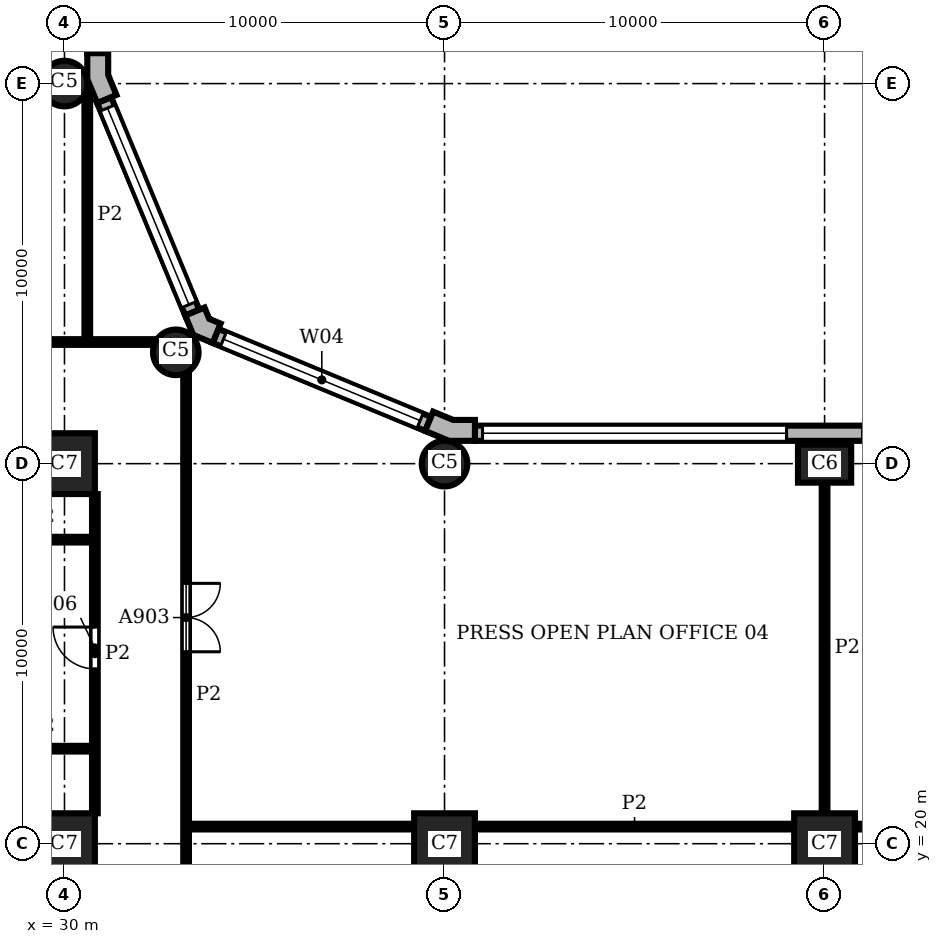
"""IFC4 building model, lengths in metres.
Left out: names, types, materials, properties, quantities, classifications, styles, units other than length and angle.
Written with IfcOpenShell. Run it as: python <this file> out.ifc"""

import sys

from ifc_helpers import new_model, si_unit, direction, frame, frame_2d, origin, origin_2d, place, context, subcontext, project, spatial, polyline, rectangle, circle, outline, extrude, element, fill, save


model = new_model("IFC4")
c1 = context("Model", 3, precision=1e-05, world=origin(), true_north=direction((0.0, 1.0)))
c2 = subcontext(c1, "Body", "Model", "MODEL_VIEW")
j1 = project(units=[si_unit("LENGTHUNIT", "METRE"), si_unit("PLANEANGLEUNIT", "RADIAN")], contexts=[c1])
p1 = place(None, origin())
s1 = spatial("IfcSite", under=j1, at=p1, CompositionType="ELEMENT")
p2 = place(p1, origin())
s2 = spatial("IfcBuilding", under=s1, at=p2, CompositionType="ELEMENT")
p3 = place(p2, frame((0.0, 0.0, 105.6)))
s3 = spatial("IfcBuildingStorey", under=s2, at=p3, CompositionType="ELEMENT", Elevation=105.6)
p4 = place(p3, frame((50.0, 30.0, 0.0), z_axis=(0.0, 0.0, 1.0), x_axis=(1.0, 0.0, 0.0)))
e1 = element("IfcColumn", 1, at=p4, inside=s3, PredefinedType="COLUMN", context=c2, shape_type="SweptSolid", body=[
    extrude(rectangle(XDim=1.4, YDim=1.0, at=origin_2d()), origin(), (0.0, 0.0, 1.0), 3.9),
])
for number, where, z_axis, x_axis in (
    (2, (40.0, 30.0, 0.0), (0.0, 0.0, 1.0), (1.0, 0.0, 0.0)),
    (3, (32.929, 32.929, 0.0), (0.0, 0.0, 1.0), (1.0, 0.0, 0.0)),
    (4, (30.0, 40.0, 0.0), (0.0, 0.0, 1.0), (1.0, 0.0, 0.0)),
):
    element("IfcColumn", number, at=place(p3, frame(where, z_axis=z_axis, x_axis=x_axis)), inside=s3, PredefinedType="COLUMN", context=c2, shape_type="SweptSolid", body=[
        extrude(circle(Radius=0.6, at=origin_2d()), origin(), (0.0, 0.0, 1.0), 3.9),
    ])
for number, where, z_axis, x_axis in (
    (5, (30.0, 20.0, 0.0), (0.0, 0.0, 1.0), (1.0, 0.0, 0.0)),
    (6, (30.0, 30.0, 0.0), (0.0, 0.0, 1.0), (1.0, 0.0, 0.0)),
    (7, (40.0, 20.0, 0.0), (0.0, 0.0, 1.0), (1.0, 0.0, 0.0)),
    (8, (50.0, 20.0, 0.0), (0.0, 0.0, 1.0), (1.0, 0.0, 0.0)),
):
    element("IfcColumn", number, at=place(p3, frame(where, z_axis=z_axis, x_axis=x_axis)), inside=s3, PredefinedType="COLUMN", context=c2, shape_type="SweptSolid", body=[
        extrude(rectangle(XDim=1.6, YDim=1.6, at=origin_2d()), origin(), (0.0, 0.0, 1.0), 3.9),
    ])
p5 = place(p3, origin())
e9 = element("IfcWall", 9, at=p5, inside=s3, PredefinedType="SOLIDWALL", context=c2, shape_type="SweptSolid", body=[
    extrude(outline(polyline([(40.8, 31.0), (40.8, 31.15), (40.229, 31.15), (39.701, 31.369), (39.644, 31.23), (39.49, 30.861), (40.119, 30.6), (40.8, 30.6), (40.8, 31.0)])), origin(), (0.0, 0.0, 1.0), 3.9),
])
e10 = element("IfcWall", 10, at=p5, inside=s3, PredefinedType="SOLIDWALL", context=c2, shape_type="SweptSolid", body=[
    extrude(outline(polyline([(34.051, 33.547), (34.108, 33.685), (33.809, 33.809), (33.685, 34.108), (33.547, 34.051), (33.177, 33.898), (33.388, 33.388), (33.898, 33.177), (34.051, 33.547)])), origin(), (0.0, 0.0, 1.0), 3.9),
])
e11 = element("IfcWall", 11, at=p5, inside=s3, PredefinedType="SOLIDWALL", context=c2, shape_type="SweptSolid", body=[
    extrude(outline(polyline([(31.23, 39.644), (31.369, 39.701), (31.15, 40.229), (31.15, 40.8), (31.0, 40.8), (30.6, 40.8), (30.6, 40.119), (30.861, 39.49), (31.23, 39.644)])), origin(), (0.0, 0.0, 1.0), 3.9),
])
p6 = place(p3, frame((69.2, 30.8, 0.0), z_axis=(0.0, 0.0, 1.0), x_axis=(-1.0, 0.0, 0.0)))
e12 = element("IfcWall", 12, at=p6, inside=s3, PredefinedType="SOLIDWALL", context=c2, shape_type="SweptSolid", body=[
    extrude(rectangle(XDim=28.4, YDim=0.4, at=frame_2d((14.2, 0.0))), origin(), (0.0, 0.0, 1.0), 3.9),
])
p7 = place(p6, frame((0.2, 0.0, 0.9)))
e13 = element("IfcOpeningElement", 13, at=p7, cuts=e12, PredefinedType="OPENING", context=c2, shape_type="SweptSolid", body=[
    extrude(rectangle(XDim=8.0, YDim=2.35, at=frame_2d((4.0, 1.175))), frame((0.0, 0.21, 0.0), z_axis=(0.0, -1.0, 0.0), x_axis=(1.0, 0.0, 0.0)), (0.0, 0.0, 1.0), 0.42),
])
p8 = place(p6, frame((10.2, 0.0, 0.9)))
e14 = element("IfcOpeningElement", 14, at=p8, cuts=e12, PredefinedType="OPENING", context=c2, shape_type="SweptSolid", body=[
    extrude(rectangle(XDim=8.0, YDim=2.35, at=frame_2d((4.0, 1.175))), frame((0.0, 0.21, 0.0), z_axis=(0.0, -1.0, 0.0), x_axis=(1.0, 0.0, 0.0)), (0.0, 0.0, 1.0), 0.42),
])
p9 = place(p6, frame((20.2, 0.0, 0.9)))
e15 = element("IfcOpeningElement", 15, at=p9, cuts=e12, PredefinedType="OPENING", context=c2, shape_type="SweptSolid", body=[
    extrude(rectangle(XDim=8.0, YDim=2.35, at=frame_2d((4.0, 1.175))), frame((0.0, 0.21, 0.0), z_axis=(0.0, -1.0, 0.0), x_axis=(1.0, 0.0, 0.0)), (0.0, 0.0, 1.0), 0.42),
])
p10 = place(p3, frame((39.567, 31.045, 0.0), z_axis=(0.0, 0.0, 1.0), x_axis=(-0.923891000409, 0.382655745237, 0.0)))
e16 = element("IfcWall", 16, at=p10, inside=s3, PredefinedType="SOLIDWALL", context=c2, shape_type="SweptSolid", body=[
    extrude(rectangle(XDim=6.053, YDim=0.4, at=frame_2d((3.027, 0.0))), origin(), (0.0, 0.0, 1.0), 3.9),
])
p11 = place(p10, frame((0.227, 0.0, 0.9)))
e17 = element("IfcOpeningElement", 17, at=p11, cuts=e16, PredefinedType="OPENING", context=c2, shape_type="SweptSolid", body=[
    extrude(rectangle(XDim=5.6, YDim=2.35, at=frame_2d((2.8, 1.175))), frame((0.0, 0.21, 0.0), z_axis=(0.0, -1.0, 0.0), x_axis=(1.0, 0.0, 0.0)), (0.0, 0.0, 1.0), 0.42),
])
p12 = place(p3, frame((33.362, 33.974, 0.0), z_axis=(0.0, 0.0, 1.0), x_axis=(-0.382655745237, 0.923891000409, 0.0)))
e18 = element("IfcWall", 18, at=p12, inside=s3, PredefinedType="SOLIDWALL", context=c2, shape_type="SweptSolid", body=[
    extrude(rectangle(XDim=6.053, YDim=0.4, at=frame_2d((3.027, 0.0))), origin(), (0.0, 0.0, 1.0), 3.9),
])
p13 = place(p12, frame((0.227, 0.0, 0.9)))
e19 = element("IfcOpeningElement", 19, at=p13, cuts=e18, PredefinedType="OPENING", context=c2, shape_type="SweptSolid", body=[
    extrude(rectangle(XDim=5.6, YDim=2.35, at=frame_2d((2.8, 1.175))), frame((0.0, 0.21, 0.0), z_axis=(0.0, -1.0, 0.0), x_axis=(1.0, 0.0, 0.0)), (0.0, 0.0, 1.0), 0.42),
])
p14 = place(p3, frame((30.8, 40.8, 0.0), z_axis=(0.0, 0.0, 1.0), x_axis=(0.0, 1.0, 0.0)))
e20 = element("IfcWall", 20, at=p14, inside=s3, PredefinedType="SOLIDWALL", context=c2, shape_type="SweptSolid", body=[
    extrude(rectangle(XDim=18.4, YDim=0.4, at=frame_2d((9.2, 0.0))), origin(), (0.0, 0.0, 1.0), 3.9),
])
p15 = place(p14, frame((0.2, 0.0, 0.9)))
e21 = element("IfcOpeningElement", 21, at=p15, cuts=e20, PredefinedType="OPENING", context=c2, shape_type="SweptSolid", body=[
    extrude(rectangle(XDim=8.0, YDim=2.35, at=frame_2d((4.0, 1.175))), frame((0.0, 0.21, 0.0), z_axis=(0.0, -1.0, 0.0), x_axis=(1.0, 0.0, 0.0)), (0.0, 0.0, 1.0), 0.42),
])
p16 = place(p14, frame((10.2, 0.0, 0.9)))
e22 = element("IfcOpeningElement", 22, at=p16, cuts=e20, PredefinedType="OPENING", context=c2, shape_type="SweptSolid", body=[
    extrude(rectangle(XDim=8.0, YDim=2.35, at=frame_2d((4.0, 1.175))), frame((0.0, 0.21, 0.0), z_axis=(0.0, -1.0, 0.0), x_axis=(1.0, 0.0, 0.0)), (0.0, 0.0, 1.0), 0.42),
])
p17 = place(p3, frame((30.6, 33.2, 0.0), z_axis=(0.0, 0.0, 1.0), x_axis=(0.0, 1.0, 0.0)))
e23 = element("IfcWall", 23, at=p17, inside=s3, PredefinedType="PARTITIONING", context=c2, shape_type="SweptSolid", body=[
    extrude(rectangle(XDim=6.699, YDim=0.15, at=frame_2d((3.35, 0.0))), origin(), (0.0, 0.0, 1.0), 3.58),
])
p18 = place(p3, frame((30.8, 20.8, 0.0), z_axis=(0.0, 0.0, 1.0), x_axis=(0.0, 1.0, 0.0)))
e24 = element("IfcWall", 24, at=p18, inside=s3, PredefinedType="PARTITIONING", context=c2, shape_type="SweptSolid", body=[
    extrude(rectangle(XDim=8.4, YDim=0.15, at=frame_2d((4.2, 0.0))), origin(), (0.0, 0.0, 1.0), 3.58),
])
p19 = place(p18, frame((3.8, 0.0, 0.0)))
e25 = element("IfcOpeningElement", 25, at=p19, cuts=e24, PredefinedType="OPENING", context=c2, shape_type="SweptSolid", body=[
    extrude(rectangle(XDim=1.1, YDim=2.1, at=frame_2d((0.55, 1.05))), frame((0.0, 0.085, 0.0), z_axis=(0.0, -1.0, 0.0), x_axis=(1.0, 0.0, 0.0)), (0.0, 0.0, 1.0), 0.17),
])
p20 = place(p3, frame((33.2, 15.45, 0.0), z_axis=(0.0, 0.0, 1.0), x_axis=(0.0, 1.0, 0.0)))
e26 = element("IfcWall", 26, at=p20, inside=s3, PredefinedType="PARTITIONING", context=c2, shape_type="SweptSolid", body=[
    extrude(rectangle(XDim=16.912, YDim=0.15, at=frame_2d((8.456, 0.0))), origin(), (0.0, 0.0, 1.0), 3.58),
])
p21 = place(p20, frame((9.6, 0.0, 0.0)))
e27 = element("IfcOpeningElement", 27, at=p21, cuts=e26, PredefinedType="OPENING", context=c2, shape_type="SweptSolid", body=[
    extrude(rectangle(XDim=1.8, YDim=2.1, at=frame_2d((0.9, 1.05))), frame((0.0, 0.085, 0.0), z_axis=(0.0, -1.0, 0.0), x_axis=(1.0, 0.0, 0.0)), (0.0, 0.0, 1.0), 0.17),
])
p22 = place(p3, frame((50.0, 20.8, 0.0), z_axis=(0.0, 0.0, 1.0), x_axis=(0.0, 1.0, 0.0)))
e28 = element("IfcWall", 28, at=p22, inside=s3, PredefinedType="PARTITIONING", context=c2, shape_type="SweptSolid", body=[
    extrude(rectangle(XDim=8.7, YDim=0.15, at=frame_2d((4.35, 0.0))), origin(), (0.0, 0.0, 1.0), 3.58),
])
p23 = place(p3, frame((33.2, 20.45, 0.0), z_axis=(0.0, 0.0, 1.0), x_axis=(1.0, 0.0, 0.0)))
e29 = element("IfcWall", 29, at=p23, inside=s3, PredefinedType="PARTITIONING", context=c2, shape_type="SweptSolid", body=[
    extrude(rectangle(XDim=6.0, YDim=0.15, at=frame_2d((3.0, 0.0))), origin(), (0.0, 0.0, 1.0), 3.58),
])
p24 = place(p3, frame((40.8, 20.45, 0.0), z_axis=(0.0, 0.0, 1.0), x_axis=(1.0, 0.0, 0.0)))
e30 = element("IfcWall", 30, at=p24, inside=s3, PredefinedType="PARTITIONING", context=c2, shape_type="SweptSolid", body=[
    extrude(rectangle(XDim=8.4, YDim=0.15, at=frame_2d((4.2, 0.0))), origin(), (0.0, 0.0, 1.0), 3.58),
])
p25 = place(p3, frame((50.8, 20.45, 0.0), z_axis=(0.0, 0.0, 1.0), x_axis=(1.0, 0.0, 0.0)))
e31 = element("IfcWall", 31, at=p25, inside=s3, PredefinedType="PARTITIONING", context=c2, shape_type="SweptSolid", body=[
    extrude(rectangle(XDim=4.2, YDim=0.15, at=frame_2d((2.1, 0.0))), origin(), (0.0, 0.0, 1.0), 3.58),
])
for number, where, z_axis, x_axis in (
    (32, (28.0, 22.5, 0.0), (0.0, 0.0, 1.0), (1.0, 0.0, 0.0)),
    (33, (28.0, 28.0, 0.0), (0.0, 0.0, 1.0), (1.0, 0.0, 0.0)),
):
    element("IfcWall", number, at=place(p3, frame(where, z_axis=z_axis, x_axis=x_axis)), inside=s3, PredefinedType="PARTITIONING", context=c2, shape_type="SweptSolid", body=[
        extrude(rectangle(XDim=2.8, YDim=0.15, at=frame_2d((1.4, 0.0))), origin(), (0.0, 0.0, 1.0), 3.58),
    ])
p26 = place(p3, frame((16.5, 33.2, 0.0), z_axis=(0.0, 0.0, 1.0), x_axis=(1.0, 0.0, 0.0)))
e34 = element("IfcWall", 34, at=p26, inside=s3, PredefinedType="PARTITIONING", context=c2, shape_type="SweptSolid", body=[
    extrude(rectangle(XDim=15.862, YDim=0.15, at=frame_2d((7.931, 0.0))), origin(), (0.0, 0.0, 1.0), 3.58),
])
p27 = place(p26, frame((10.05, 0.0, 0.0)))
e35 = element("IfcOpeningElement", 35, at=p27, cuts=e34, PredefinedType="OPENING", context=c2, shape_type="SweptSolid", body=[
    extrude(rectangle(XDim=1.8, YDim=2.1, at=frame_2d((0.9, 1.05))), frame((0.0, 0.085, 0.0), z_axis=(0.0, -1.0, 0.0), x_axis=(1.0, 0.0, 0.0)), (0.0, 0.0, 1.0), 0.17),
])
p28 = place(p9, origin())
e36 = element("IfcWindow", 36, at=p28, inside=s3, PartitioningType="SINGLE_PANEL", PredefinedType="WINDOW", context=c2, shape_type="SweptSolid", body=[
    extrude(rectangle(XDim=8.0, YDim=2.35, at=frame_2d((4.0, 1.175))), frame((0.0, 0.16, 0.0), z_axis=(0.0, -1.0, 0.0), x_axis=(1.0, 0.0, 0.0)), (0.0, 0.0, 1.0), 0.06),
])
fill(e15, e36)
p29 = place(p11, origin())
e37 = element("IfcWindow", 37, at=p29, inside=s3, PartitioningType="SINGLE_PANEL", PredefinedType="WINDOW", context=c2, shape_type="SweptSolid", body=[
    extrude(rectangle(XDim=5.6, YDim=2.35, at=frame_2d((2.8, 1.175))), frame((0.0, 0.16, 0.0), z_axis=(0.0, -1.0, 0.0), x_axis=(1.0, 0.0, 0.0)), (0.0, 0.0, 1.0), 0.06),
])
fill(e17, e37)
p30 = place(p13, origin())
e38 = element("IfcWindow", 38, at=p30, inside=s3, PartitioningType="SINGLE_PANEL", PredefinedType="WINDOW", context=c2, shape_type="SweptSolid", body=[
    extrude(rectangle(XDim=5.6, YDim=2.35, at=frame_2d((2.8, 1.175))), frame((0.0, 0.16, 0.0), z_axis=(0.0, -1.0, 0.0), x_axis=(1.0, 0.0, 0.0)), (0.0, 0.0, 1.0), 0.06),
])
fill(e19, e38)
p31 = place(p21, frame((1.8, 0.0, 0.0), z_axis=(0.0, 0.0, 1.0), x_axis=(-1.0, 0.0, 0.0)))
e39 = element("IfcDoor", 39, at=p31, inside=s3, OperationType="DOUBLE_DOOR_SINGLE_SWING", PredefinedType="DOOR", context=c2, shape_type="SweptSolid", body=[
    extrude(rectangle(XDim=1.8, YDim=2.1, at=frame_2d((0.9, 1.05))), frame((0.0, 0.025, 0.0), z_axis=(0.0, -1.0, 0.0), x_axis=(1.0, 0.0, 0.0)), (0.0, 0.0, 1.0), 0.05),
])
fill(e27, e39)
p32 = place(p19, origin())
e40 = element("IfcDoor", 40, at=p32, inside=s3, OperationType="SINGLE_SWING_RIGHT", PredefinedType="DOOR", context=c2, shape_type="SweptSolid", body=[
    extrude(rectangle(XDim=1.1, YDim=2.1, at=frame_2d((0.55, 1.05))), frame((0.0, 0.025, 0.0), z_axis=(0.0, -1.0, 0.0), x_axis=(1.0, 0.0, 0.0)), (0.0, 0.0, 1.0), 0.05),
])
fill(e25, e40)
save(model, sys.argv[1])
